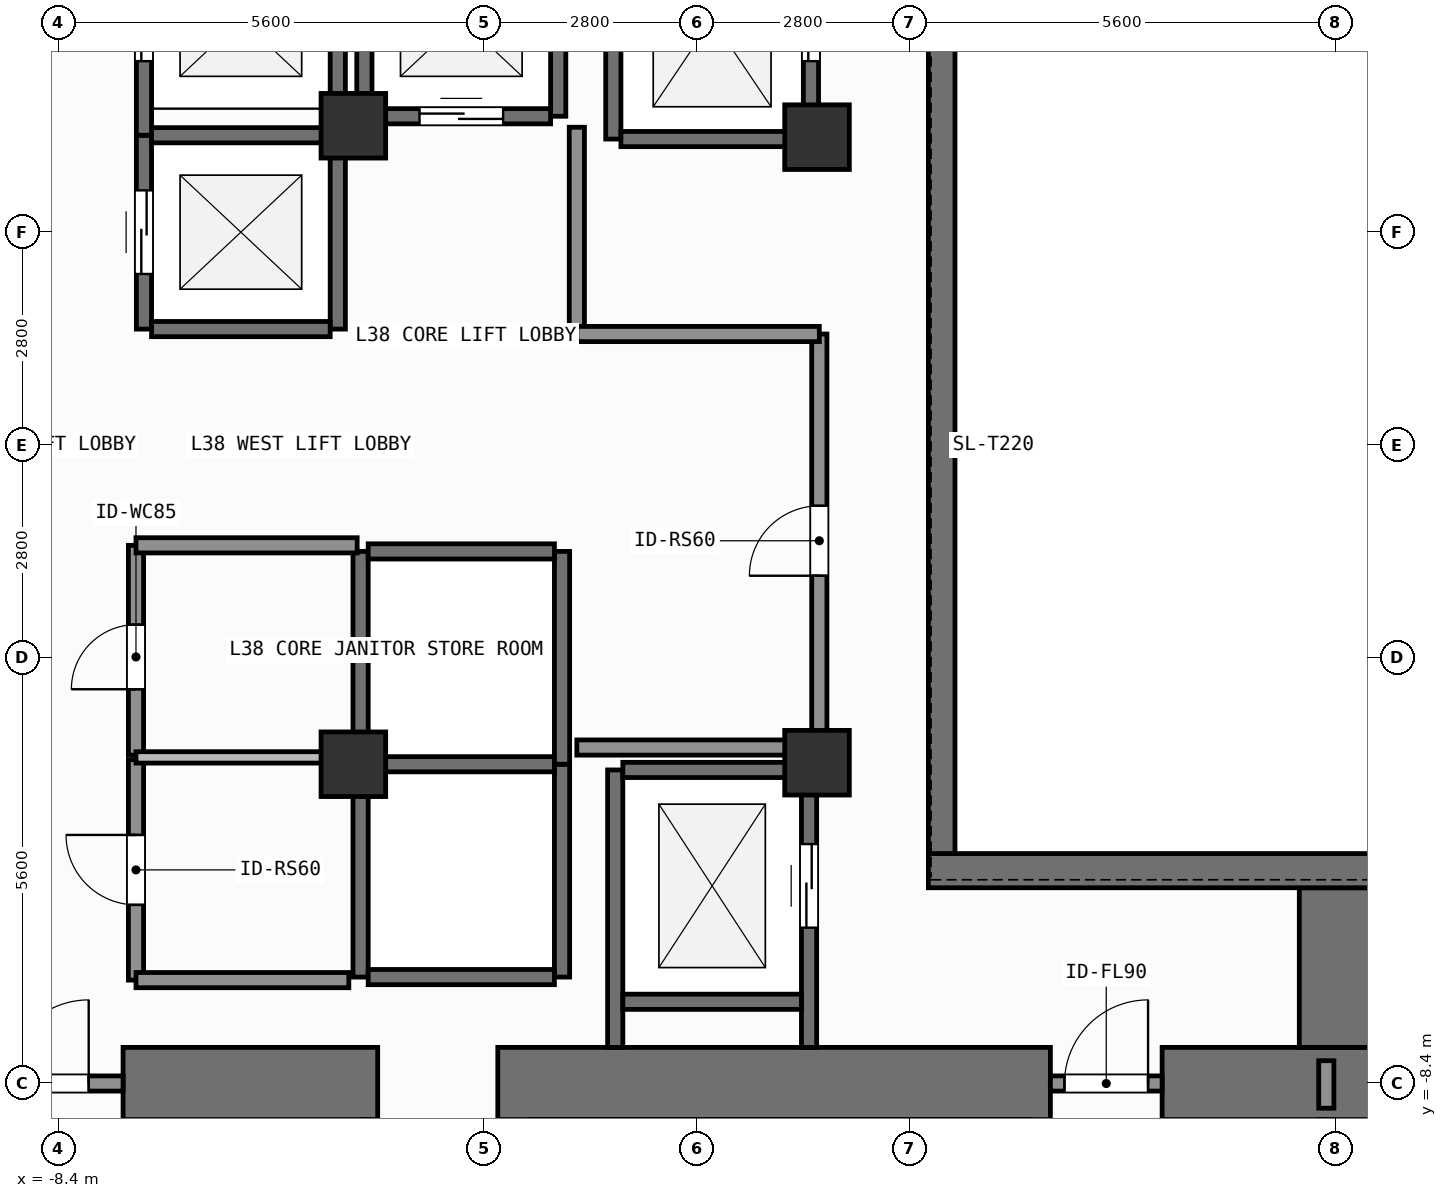
"""IFC4 building model, lengths in metres.
Left out: names, types, materials, properties, quantities, classifications, styles, units other than length and angle.
Written with IfcOpenShell. Run it as: python <this file> out.ifc"""

import sys

from ifc_helpers import new_model, si_unit, direction, frame, frame_2d, origin, origin_2d, place, context, subcontext, project, spatial, rectangle, extrude, element, fill, save


model = new_model("IFC4")
c1 = context("Model", 3, precision=1e-05, world=origin(), true_north=direction((0.0, 1.0)))
c2 = subcontext(c1, "Body", "Model", "MODEL_VIEW")
j1 = project(units=[si_unit("LENGTHUNIT", "METRE"), si_unit("PLANEANGLEUNIT", "RADIAN")], contexts=[c1])
p1 = place(None, origin())
s1 = spatial("IfcSite", under=j1, at=p1, CompositionType="ELEMENT")
p2 = place(p1, origin())
s2 = spatial("IfcBuilding", under=s1, at=p2, CompositionType="ELEMENT")
p3 = place(p2, frame((0.0, 0.0, 152.4)))
s3 = spatial("IfcBuildingStorey", under=s2, at=p3, CompositionType="ELEMENT", Elevation=152.4)
p4 = place(p3, frame((-7.55, -8.4, 0.0), z_axis=(0.0, 0.0, 1.0), x_axis=(1.0, 0.0, 0.0)))
e1 = element("IfcWall", 1, at=p4, inside=s3, PredefinedType="SHEAR", context=c2, shape_type="SweptSolid", body=[
    extrude(rectangle(XDim=3.35, YDim=0.95, at=frame_2d((1.675, 0.0))), origin(), (0.0, 0.0, 1.0), 3.9),
])
p5 = place(p3, frame((-2.62, -8.4, 0.0), z_axis=(0.0, 0.0, 1.0), x_axis=(1.0, 0.0, 0.0)))
e2 = element("IfcWall", 2, at=p5, inside=s3, PredefinedType="SHEAR", context=c2, shape_type="SweptSolid", body=[
    extrude(rectangle(XDim=7.27, YDim=0.95, at=frame_2d((3.635, 0.0))), origin(), (0.0, 0.0, 1.0), 3.9),
])
p6 = place(p3, frame((6.12, -8.4, 0.0), z_axis=(0.0, 0.0, 1.0), x_axis=(1.0, 0.0, 0.0)))
e3 = element("IfcWall", 3, at=p6, inside=s3, PredefinedType="SHEAR", context=c2, shape_type="SweptSolid", body=[
    extrude(rectangle(XDim=2.755, YDim=0.95, at=frame_2d((1.377, 0.0))), origin(), (0.0, 0.0, 1.0), 3.9),
])
p7 = place(p3, frame((8.4, -7.925, 0.0), z_axis=(0.0, 0.0, 1.0), x_axis=(0.0, 1.0, 0.0)))
e4 = element("IfcWall", 4, at=p7, inside=s3, PredefinedType="SHEAR", context=c2, shape_type="SweptSolid", body=[
    extrude(rectangle(XDim=2.1, YDim=0.95, at=frame_2d((1.05, 0.0))), origin(), (0.0, 0.0, 1.0), 3.9),
])
p8 = place(p3, frame((3.045, -5.6, 0.0), z_axis=(0.0, 0.0, 1.0), x_axis=(1.0, 0.0, 0.0)))
e5 = element("IfcWall", 5, at=p8, inside=s3, PredefinedType="SHEAR", context=c2, shape_type="SweptSolid", body=[
    extrude(rectangle(XDim=5.83, YDim=0.45, at=frame_2d((2.915, 0.0))), origin(), (0.0, 0.0, 1.0), 3.9),
])
p9 = place(p3, frame((3.22, -5.375, 0.0), z_axis=(0.0, 0.0, 1.0), x_axis=(0.0, 1.0, 0.0)))
e6 = element("IfcWall", 6, at=p9, inside=s3, PredefinedType="SHEAR", context=c2, shape_type="SweptSolid", body=[
    extrude(rectangle(XDim=10.75, YDim=0.35, at=frame_2d((5.375, 0.0))), origin(), (0.0, 0.0, 1.0), 3.9),
])
for number, where, z_axis, x_axis in (
    (7, (-4.52, -4.2, 0.0), (0.0, 0.0, 1.0), (1.0, 0.0, 0.0)),
    (8, (1.58, -4.18, 0.0), (0.0, 0.0, 1.0), (1.0, 0.0, 0.0)),
    (9, (1.58, 4.05, 0.0), (0.0, 0.0, 1.0), (1.0, 0.0, 0.0)),
    (10, (-4.52, 4.2, 0.0), (0.0, 0.0, 1.0), (1.0, 0.0, 0.0)),
):
    element("IfcColumn", number, at=place(p3, frame(where, z_axis=z_axis, x_axis=x_axis)), inside=s3, PredefinedType="COLUMN", context=c2, shape_type="SweptSolid", body=[
        extrude(rectangle(XDim=0.85, YDim=0.85, at=origin_2d()), origin(), (0.0, 0.0, 1.0), 3.9),
    ])
p10 = place(p3, frame((-7.275, 1.525, 0.0), z_axis=(0.0, 0.0, 1.0), x_axis=(0.0, 1.0, 0.0)))
e11 = element("IfcWall", 11, at=p10, inside=s3, PredefinedType="SHEAR", context=c2, shape_type="SweptSolid", body=[
    extrude(rectangle(XDim=2.55, YDim=0.2, at=frame_2d((1.275, 0.0))), origin(), (0.0, 0.0, 1.0), 3.6),
])
p11 = place(p10, frame((0.725, 0.0, 0.0)))
e12 = element("IfcOpeningElement", 12, at=p11, cuts=e11, PredefinedType="OPENING", context=c2, shape_type="SweptSolid", body=[
    extrude(rectangle(XDim=1.1, YDim=2.2, at=frame_2d((0.55, 1.1))), frame((0.0, 0.11, 0.0), z_axis=(0.0, -1.0, 0.0), x_axis=(1.0, 0.0, 0.0)), (0.0, 0.0, 1.0), 0.22),
])
p12 = place(p3, frame((-4.725, 1.525, 0.0), z_axis=(0.0, 0.0, 1.0), x_axis=(0.0, 1.0, 0.0)))
e13 = element("IfcWall", 13, at=p12, inside=s3, PredefinedType="SHEAR", context=c2, shape_type="SweptSolid", body=[
    extrude(rectangle(XDim=2.55, YDim=0.2, at=frame_2d((1.275, 0.0))), origin(), (0.0, 0.0, 1.0), 3.6),
])
for number, where, z_axis, x_axis in (
    (14, (-7.175, 1.525, 0.0), (0.0, 0.0, 1.0), (1.0, 0.0, 0.0)),
    (15, (-7.175, 4.075, 0.0), (0.0, 0.0, 1.0), (1.0, 0.0, 0.0)),
):
    element("IfcWall", number, at=place(p3, frame(where, z_axis=z_axis, x_axis=x_axis)), inside=s3, PredefinedType="SHEAR", context=c2, shape_type="SweptSolid", body=[
        extrude(rectangle(XDim=2.35, YDim=0.2, at=frame_2d((1.175, 0.0))), origin(), (0.0, 0.0, 1.0), 3.6),
    ])
p13 = place(p3, frame((-7.275, 4.075, 0.0), z_axis=(0.0, 0.0, 1.0), x_axis=(0.0, 1.0, 0.0)))
e16 = element("IfcWall", 16, at=p13, inside=s3, PredefinedType="SHEAR", context=c2, shape_type="SweptSolid", body=[
    extrude(rectangle(XDim=2.8, YDim=0.2, at=frame_2d((1.4, 0.0))), origin(), (0.0, 0.0, 1.0), 3.6),
])
p14 = place(p13, frame((0.975, 0.0, 0.0)))
e17 = element("IfcOpeningElement", 17, at=p14, cuts=e16, PredefinedType="OPENING", context=c2, shape_type="SweptSolid", body=[
    extrude(rectangle(XDim=1.1, YDim=2.2, at=frame_2d((0.55, 1.1))), frame((0.0, 0.11, 0.0), z_axis=(0.0, -1.0, 0.0), x_axis=(1.0, 0.0, 0.0)), (0.0, 0.0, 1.0), 0.22),
])
p15 = place(p3, frame((-4.725, 4.075, 0.0), z_axis=(0.0, 0.0, 1.0), x_axis=(0.0, 1.0, 0.0)))
e18 = element("IfcWall", 18, at=p15, inside=s3, PredefinedType="SHEAR", context=c2, shape_type="SweptSolid", body=[
    extrude(rectangle(XDim=2.8, YDim=0.2, at=frame_2d((1.4, 0.0))), origin(), (0.0, 0.0, 1.0), 3.6),
])
for number, where, z_axis, x_axis in (
    (19, (-4.375, 4.325, 0.0), (0.0, 0.0, 1.0), (0.0, 1.0, 0.0)),
    (20, (-1.825, 4.325, 0.0), (0.0, 0.0, 1.0), (0.0, 1.0, 0.0)),
):
    element("IfcWall", number, at=place(p3, frame(where, z_axis=z_axis, x_axis=x_axis)), inside=s3, PredefinedType="SHEAR", context=c2, shape_type="SweptSolid", body=[
        extrude(rectangle(XDim=2.55, YDim=0.2, at=frame_2d((1.275, 0.0))), origin(), (0.0, 0.0, 1.0), 3.6),
    ])
p16 = place(p3, frame((-4.275, 4.325, 0.0), z_axis=(0.0, 0.0, 1.0), x_axis=(1.0, 0.0, 0.0)))
e21 = element("IfcWall", 21, at=p16, inside=s3, PredefinedType="SHEAR", context=c2, shape_type="SweptSolid", body=[
    extrude(rectangle(XDim=2.35, YDim=0.2, at=frame_2d((1.175, 0.0))), origin(), (0.0, 0.0, 1.0), 3.6),
])
p17 = place(p16, frame((0.625, 0.0, 0.0)))
e22 = element("IfcOpeningElement", 22, at=p17, cuts=e21, PredefinedType="OPENING", context=c2, shape_type="SweptSolid", body=[
    extrude(rectangle(XDim=1.1, YDim=2.2, at=frame_2d((0.55, 1.1))), frame((0.0, 0.11, 0.0), z_axis=(0.0, -1.0, 0.0), x_axis=(1.0, 0.0, 0.0)), (0.0, 0.0, 1.0), 0.22),
])
for number, where, z_axis, x_axis in (
    (23, (-4.425, -7.0, 0.0), (0.0, 0.0, 1.0), (0.0, 1.0, 0.0)),
    (24, (-1.775, -7.0, 0.0), (0.0, 0.0, 1.0), (0.0, 1.0, 0.0)),
):
    element("IfcWall", number, at=place(p3, frame(where, z_axis=z_axis, x_axis=x_axis)), inside=s3, PredefinedType="SHEAR", context=c2, shape_type="SweptSolid", body=[
        extrude(rectangle(XDim=2.8, YDim=0.2, at=frame_2d((1.4, 0.0))), origin(), (0.0, 0.0, 1.0), 3.6),
    ])
for number, where, z_axis, x_axis in (
    (25, (-4.325, -7.0, 0.0), (0.0, 0.0, 1.0), (1.0, 0.0, 0.0)),
    (26, (-4.325, -4.2, 0.0), (0.0, 0.0, 1.0), (1.0, 0.0, 0.0)),
):
    element("IfcWall", number, at=place(p3, frame(where, z_axis=z_axis, x_axis=x_axis)), inside=s3, PredefinedType="SHEAR", context=c2, shape_type="SweptSolid", body=[
        extrude(rectangle(XDim=2.45, YDim=0.2, at=frame_2d((1.225, 0.0))), origin(), (0.0, 0.0, 1.0), 3.6),
    ])
for number, where, z_axis, x_axis in (
    (27, (-4.425, -4.2, 0.0), (0.0, 0.0, 1.0), (0.0, 1.0, 0.0)),
    (28, (-1.775, -4.2, 0.0), (0.0, 0.0, 1.0), (0.0, 1.0, 0.0)),
):
    element("IfcWall", number, at=place(p3, frame(where, z_axis=z_axis, x_axis=x_axis)), inside=s3, PredefinedType="SHEAR", context=c2, shape_type="SweptSolid", body=[
        extrude(rectangle(XDim=2.8, YDim=0.2, at=frame_2d((1.4, 0.0))), origin(), (0.0, 0.0, 1.0), 3.6),
    ])
p18 = place(p3, frame((-4.325, -1.4, 0.0), z_axis=(0.0, 0.0, 1.0), x_axis=(1.0, 0.0, 0.0)))
e29 = element("IfcWall", 29, at=p18, inside=s3, PredefinedType="SHEAR", context=c2, shape_type="SweptSolid", body=[
    extrude(rectangle(XDim=2.45, YDim=0.2, at=frame_2d((1.225, 0.0))), origin(), (0.0, 0.0, 1.0), 3.6),
])
p19 = place(p3, frame((-1.1, 4.025, 0.0), z_axis=(0.0, 0.0, 1.0), x_axis=(0.0, 1.0, 0.0)))
e30 = element("IfcWall", 30, at=p19, inside=s3, PredefinedType="SHEAR", context=c2, shape_type="SweptSolid", body=[
    extrude(rectangle(XDim=3.15, YDim=0.2, at=frame_2d((1.575, 0.0))), origin(), (0.0, 0.0, 1.0), 3.6),
])
p20 = place(p3, frame((1.5, 4.025, 0.0), z_axis=(0.0, 0.0, 1.0), x_axis=(0.0, 1.0, 0.0)))
e31 = element("IfcWall", 31, at=p20, inside=s3, PredefinedType="SHEAR", context=c2, shape_type="SweptSolid", body=[
    extrude(rectangle(XDim=3.15, YDim=0.2, at=frame_2d((1.575, 0.0))), origin(), (0.0, 0.0, 1.0), 3.6),
])
p21 = place(p20, frame((1.025, 0.0, 0.0)))
e32 = element("IfcOpeningElement", 32, at=p21, cuts=e31, PredefinedType="OPENING", context=c2, shape_type="SweptSolid", body=[
    extrude(rectangle(XDim=1.1, YDim=2.2, at=frame_2d((0.55, 1.1))), frame((0.0, 0.11, 0.0), z_axis=(0.0, -1.0, 0.0), x_axis=(1.0, 0.0, 0.0)), (0.0, 0.0, 1.0), 0.22),
])
p22 = place(p3, frame((-1.0, 4.025, 0.0), z_axis=(0.0, 0.0, 1.0), x_axis=(1.0, 0.0, 0.0)))
e33 = element("IfcWall", 33, at=p22, inside=s3, PredefinedType="SHEAR", context=c2, shape_type="SweptSolid", body=[
    extrude(rectangle(XDim=2.4, YDim=0.2, at=frame_2d((1.2, 0.0))), origin(), (0.0, 0.0, 1.0), 3.6),
])
p23 = place(p3, frame((-1.075, -7.925, 0.0), z_axis=(0.0, 0.0, 1.0), x_axis=(0.0, 1.0, 0.0)))
e34 = element("IfcWall", 34, at=p23, inside=s3, PredefinedType="SHEAR", context=c2, shape_type="SweptSolid", body=[
    extrude(rectangle(XDim=3.65, YDim=0.2, at=frame_2d((1.825, 0.0))), origin(), (0.0, 0.0, 1.0), 3.6),
])
p24 = place(p3, frame((1.475, -7.925, 0.0), z_axis=(0.0, 0.0, 1.0), x_axis=(0.0, 1.0, 0.0)))
e35 = element("IfcWall", 35, at=p24, inside=s3, PredefinedType="SHEAR", context=c2, shape_type="SweptSolid", body=[
    extrude(rectangle(XDim=3.65, YDim=0.2, at=frame_2d((1.825, 0.0))), origin(), (0.0, 0.0, 1.0), 3.6),
])
p25 = place(p24, frame((1.575, 0.0, 0.0)))
e36 = element("IfcOpeningElement", 36, at=p25, cuts=e35, PredefinedType="OPENING", context=c2, shape_type="SweptSolid", body=[
    extrude(rectangle(XDim=1.1, YDim=2.2, at=frame_2d((0.55, 1.1))), frame((0.0, 0.11, 0.0), z_axis=(0.0, -1.0, 0.0), x_axis=(1.0, 0.0, 0.0)), (0.0, 0.0, 1.0), 0.22),
])
for number, where, z_axis, x_axis in (
    (37, (-0.975, -7.325, 0.0), (0.0, 0.0, 1.0), (1.0, 0.0, 0.0)),
    (38, (-0.975, -4.275, 0.0), (0.0, 0.0, 1.0), (1.0, 0.0, 0.0)),
):
    element("IfcWall", number, at=place(p3, frame(where, z_axis=z_axis, x_axis=x_axis)), inside=s3, PredefinedType="SHEAR", context=c2, shape_type="SweptSolid", body=[
        extrude(rectangle(XDim=2.35, YDim=0.2, at=frame_2d((1.175, 0.0))), origin(), (0.0, 0.0, 1.0), 3.6),
    ])
p26 = place(p3, frame((4.65, -8.4, 0.0), z_axis=(0.0, 0.0, 1.0), x_axis=(1.0, 0.0, 0.0)))
e39 = element("IfcWall", 39, at=p26, inside=s3, PredefinedType="SOLIDWALL", context=c2, shape_type="SweptSolid", body=[
    extrude(rectangle(XDim=1.47, YDim=0.2, at=frame_2d((0.735, 0.0))), origin(), (0.0, 0.0, 1.0), 2.64),
])
p27 = place(p26, frame((0.185, 0.0, 0.0)))
e40 = element("IfcOpeningElement", 40, at=p27, cuts=e39, PredefinedType="OPENING", context=c2, shape_type="SweptSolid", body=[
    extrude(rectangle(XDim=1.1, YDim=2.15, at=frame_2d((0.55, 1.075))), frame((0.0, 0.11, 0.0), z_axis=(0.0, -1.0, 0.0), x_axis=(1.0, 0.0, 0.0)), (0.0, 0.0, 1.0), 0.22),
])
p28 = place(p3, frame((-9.7, -8.4, 0.0), z_axis=(0.0, 0.0, 1.0), x_axis=(1.0, 0.0, 0.0)))
e41 = element("IfcWall", 41, at=p28, inside=s3, PredefinedType="SOLIDWALL", context=c2, shape_type="SweptSolid", body=[
    extrude(rectangle(XDim=2.15, YDim=0.2, at=frame_2d((1.075, 0.0))), origin(), (0.0, 0.0, 1.0), 2.64),
])
p29 = place(p28, frame((0.598, 0.0, 0.0)))
e42 = element("IfcOpeningElement", 42, at=p29, cuts=e41, PredefinedType="OPENING", context=c2, shape_type="SweptSolid", body=[
    extrude(rectangle(XDim=1.1, YDim=2.15, at=frame_2d((0.55, 1.075))), frame((0.0, 0.11, 0.0), z_axis=(0.0, -1.0, 0.0), x_axis=(1.0, 0.0, 0.0)), (0.0, 0.0, 1.0), 0.22),
])
p30 = place(p3, frame((1.61, -3.98, 0.0), z_axis=(0.0, 0.0, 1.0), x_axis=(0.0, 1.0, 0.0)))
e43 = element("IfcWall", 43, at=p30, inside=s3, PredefinedType="SOLIDWALL", context=c2, shape_type="SweptSolid", body=[
    extrude(rectangle(XDim=5.44, YDim=0.2, at=frame_2d((2.72, 0.0))), origin(), (0.0, 0.0, 1.0), 3.6),
])
p31 = place(p30, frame((2.26, 0.0, 0.0)))
e44 = element("IfcOpeningElement", 44, at=p31, cuts=e43, PredefinedType="OPENING", context=c2, shape_type="SweptSolid", body=[
    extrude(rectangle(XDim=0.92, YDim=2.1, at=frame_2d((0.46, 1.05))), frame((0.0, 0.11, 0.0), z_axis=(0.0, -1.0, 0.0), x_axis=(1.0, 0.0, 0.0)), (0.0, 0.0, 1.0), 0.22),
])
p32 = place(p3, frame((-7.38, -7.04, 0.0), z_axis=(0.0, 0.0, 1.0), x_axis=(0.0, 1.0, 0.0)))
e45 = element("IfcWall", 45, at=p32, inside=s3, PredefinedType="SOLIDWALL", context=c2, shape_type="SweptSolid", body=[
    extrude(rectangle(XDim=2.9, YDim=0.2, at=frame_2d((1.45, 0.0))), origin(), (0.0, 0.0, 1.0), 3.6),
])
p33 = place(p32, frame((0.99, 0.0, 0.0)))
e46 = element("IfcOpeningElement", 46, at=p33, cuts=e45, PredefinedType="OPENING", context=c2, shape_type="SweptSolid", body=[
    extrude(rectangle(XDim=0.92, YDim=2.1, at=frame_2d((0.46, 1.05))), frame((0.0, 0.11, 0.0), z_axis=(0.0, -1.0, 0.0), x_axis=(1.0, 0.0, 0.0)), (0.0, 0.0, 1.0), 0.22),
])
p34 = place(p3, frame((-7.38, -4.08, 0.0), z_axis=(0.0, 0.0, 1.0), x_axis=(0.0, 1.0, 0.0)))
e47 = element("IfcWall", 47, at=p34, inside=s3, PredefinedType="SOLIDWALL", context=c2, shape_type="SweptSolid", body=[
    extrude(rectangle(XDim=2.76, YDim=0.2, at=frame_2d((1.38, 0.0))), origin(), (0.0, 0.0, 1.0), 3.6),
])
p35 = place(p34, frame((0.867, 0.0, 0.0)))
e48 = element("IfcOpeningElement", 48, at=p35, cuts=e47, PredefinedType="OPENING", context=c2, shape_type="SweptSolid", body=[
    extrude(rectangle(XDim=0.85, YDim=2.1, at=frame_2d((0.425, 1.05))), frame((0.0, 0.11, 0.0), z_axis=(0.0, -1.0, 0.0), x_axis=(1.0, 0.0, 0.0)), (0.0, 0.0, 1.0), 0.22),
])
p36 = place(p3, frame((-7.38, -1.32, 0.0), z_axis=(0.0, 0.0, 1.0), x_axis=(1.0, 0.0, 0.0)))
e49 = element("IfcWall", 49, at=p36, inside=s3, PredefinedType="SOLIDWALL", context=c2, shape_type="SweptSolid", body=[
    extrude(rectangle(XDim=2.91, YDim=0.2, at=frame_2d((1.455, 0.0))), origin(), (0.0, 0.0, 1.0), 3.6),
])
p37 = place(p3, frame((-1.58, 1.48, 0.0), z_axis=(0.0, 0.0, 1.0), x_axis=(0.0, 1.0, 0.0)))
e50 = element("IfcWall", 50, at=p37, inside=s3, PredefinedType="SOLIDWALL", context=c2, shape_type="SweptSolid", body=[
    extrude(rectangle(XDim=2.7, YDim=0.2, at=frame_2d((1.35, 0.0))), origin(), (0.0, 0.0, 1.0), 3.6),
])
for number, where, z_axis, x_axis in (
    (51, (-1.58, -3.98, 0.0), (0.0, 0.0, 1.0), (1.0, 0.0, 0.0)),
    (52, (-1.58, 1.46, 0.0), (0.0, 0.0, 1.0), (1.0, 0.0, 0.0)),
):
    element("IfcWall", number, at=place(p3, frame(where, z_axis=z_axis, x_axis=x_axis)), inside=s3, PredefinedType="SOLIDWALL", context=c2, shape_type="SweptSolid", body=[
        extrude(rectangle(XDim=3.19, YDim=0.2, at=frame_2d((1.595, 0.0))), origin(), (0.0, 0.0, 1.0), 3.6),
    ])
p38 = place(p3, frame((-7.38, -7.04, 0.0), z_axis=(0.0, 0.0, 1.0), x_axis=(1.0, 0.0, 0.0)))
e53 = element("IfcWall", 53, at=p38, inside=s3, PredefinedType="SOLIDWALL", context=c2, shape_type="SweptSolid", body=[
    extrude(rectangle(XDim=2.8, YDim=0.2, at=frame_2d((1.4, 0.0))), origin(), (0.0, 0.0, 1.0), 3.6),
])
p39 = place(p3, frame((-7.38, -4.11, 0.0), z_axis=(0.0, 0.0, 1.0), x_axis=(1.0, 0.0, 0.0)))
e54 = element("IfcWall", 54, at=p39, inside=s3, PredefinedType="PARTITIONING", context=c2, shape_type="SweptSolid", body=[
    extrude(rectangle(XDim=2.8, YDim=0.15, at=frame_2d((1.4, 0.0))), origin(), (0.0, 0.0, 1.0), 3.6),
])
p40 = place(p3, frame((8.28, -8.725, 0.0), z_axis=(0.0, 0.0, 1.0), x_axis=(0.0, 1.0, 0.0)))
e55 = element("IfcWall", 55, at=p40, inside=s3, PredefinedType="SOLIDWALL", context=c2, shape_type="SweptSolid", body=[
    extrude(rectangle(XDim=0.625, YDim=0.2, at=frame_2d((0.312, 0.0))), origin(), (0.0, 0.0, 1.0), 3.6),
])
p41 = place(p11, origin())
e56 = element("IfcDoor", 56, at=p41, inside=s3, OperationType="SLIDING_TO_LEFT", PredefinedType="DOOR", context=c2, shape_type="SweptSolid", body=[
    extrude(rectangle(XDim=1.1, YDim=2.2, at=frame_2d((0.55, 1.1))), frame((0.0, 0.025, 0.0), z_axis=(0.0, -1.0, 0.0), x_axis=(1.0, 0.0, 0.0)), (0.0, 0.0, 1.0), 0.05),
])
fill(e12, e56)
p42 = place(p14, origin())
e57 = element("IfcDoor", 57, at=p42, inside=s3, OperationType="SLIDING_TO_LEFT", PredefinedType="DOOR", context=c2, shape_type="SweptSolid", body=[
    extrude(rectangle(XDim=1.1, YDim=2.2, at=frame_2d((0.55, 1.1))), frame((0.0, 0.025, 0.0), z_axis=(0.0, -1.0, 0.0), x_axis=(1.0, 0.0, 0.0)), (0.0, 0.0, 1.0), 0.05),
])
fill(e17, e57)
p43 = place(p17, origin())
e58 = element("IfcDoor", 58, at=p43, inside=s3, OperationType="SLIDING_TO_LEFT", PredefinedType="DOOR", context=c2, shape_type="SweptSolid", body=[
    extrude(rectangle(XDim=1.1, YDim=2.2, at=frame_2d((0.55, 1.1))), frame((0.0, 0.025, 0.0), z_axis=(0.0, -1.0, 0.0), x_axis=(1.0, 0.0, 0.0)), (0.0, 0.0, 1.0), 0.05),
])
fill(e22, e58)
p44 = place(p21, origin())
e59 = element("IfcDoor", 59, at=p44, inside=s3, OperationType="SLIDING_TO_LEFT", PredefinedType="DOOR", context=c2, shape_type="SweptSolid", body=[
    extrude(rectangle(XDim=1.1, YDim=2.2, at=frame_2d((0.55, 1.1))), frame((0.0, 0.025, 0.0), z_axis=(0.0, -1.0, 0.0), x_axis=(1.0, 0.0, 0.0)), (0.0, 0.0, 1.0), 0.05),
])
fill(e32, e59)
p45 = place(p25, origin())
e60 = element("IfcDoor", 60, at=p45, inside=s3, OperationType="SLIDING_TO_LEFT", PredefinedType="DOOR", context=c2, shape_type="SweptSolid", body=[
    extrude(rectangle(XDim=1.1, YDim=2.2, at=frame_2d((0.55, 1.1))), frame((0.0, 0.025, 0.0), z_axis=(0.0, -1.0, 0.0), x_axis=(1.0, 0.0, 0.0)), (0.0, 0.0, 1.0), 0.05),
])
fill(e36, e60)
p46 = place(p27, origin())
e61 = element("IfcDoor", 61, at=p46, inside=s3, OperationType="SINGLE_SWING_RIGHT", PredefinedType="DOOR", context=c2, shape_type="SweptSolid", body=[
    extrude(rectangle(XDim=1.1, YDim=2.15, at=frame_2d((0.55, 1.075))), frame((0.0, 0.025, 0.0), z_axis=(0.0, -1.0, 0.0), x_axis=(1.0, 0.0, 0.0)), (0.0, 0.0, 1.0), 0.05),
])
fill(e40, e61)
p47 = place(p29, origin())
e62 = element("IfcDoor", 62, at=p47, inside=s3, OperationType="SINGLE_SWING_RIGHT", PredefinedType="DOOR", context=c2, shape_type="SweptSolid", body=[
    extrude(rectangle(XDim=1.1, YDim=2.15, at=frame_2d((0.55, 1.075))), frame((0.0, 0.025, 0.0), z_axis=(0.0, -1.0, 0.0), x_axis=(1.0, 0.0, 0.0)), (0.0, 0.0, 1.0), 0.05),
])
fill(e42, e62)
p48 = place(p31, origin())
e63 = element("IfcDoor", 63, at=p48, inside=s3, OperationType="SINGLE_SWING_LEFT", PredefinedType="DOOR", context=c2, shape_type="SweptSolid", body=[
    extrude(rectangle(XDim=0.92, YDim=2.1, at=frame_2d((0.46, 1.05))), frame((0.0, 0.025, 0.0), z_axis=(0.0, -1.0, 0.0), x_axis=(1.0, 0.0, 0.0)), (0.0, 0.0, 1.0), 0.05),
])
fill(e44, e63)
p49 = place(p33, origin())
e64 = element("IfcDoor", 64, at=p49, inside=s3, OperationType="SINGLE_SWING_RIGHT", PredefinedType="DOOR", context=c2, shape_type="SweptSolid", body=[
    extrude(rectangle(XDim=0.92, YDim=2.1, at=frame_2d((0.46, 1.05))), frame((0.0, 0.025, 0.0), z_axis=(0.0, -1.0, 0.0), x_axis=(1.0, 0.0, 0.0)), (0.0, 0.0, 1.0), 0.05),
])
fill(e46, e64)
p50 = place(p35, origin())
e65 = element("IfcDoor", 65, at=p50, inside=s3, OperationType="SINGLE_SWING_LEFT", PredefinedType="DOOR", context=c2, shape_type="SweptSolid", body=[
    extrude(rectangle(XDim=0.85, YDim=2.1, at=frame_2d((0.425, 1.05))), frame((0.0, 0.025, 0.0), z_axis=(0.0, -1.0, 0.0), x_axis=(1.0, 0.0, 0.0)), (0.0, 0.0, 1.0), 0.05),
])
fill(e48, e65)
save(model, sys.argv[1])
